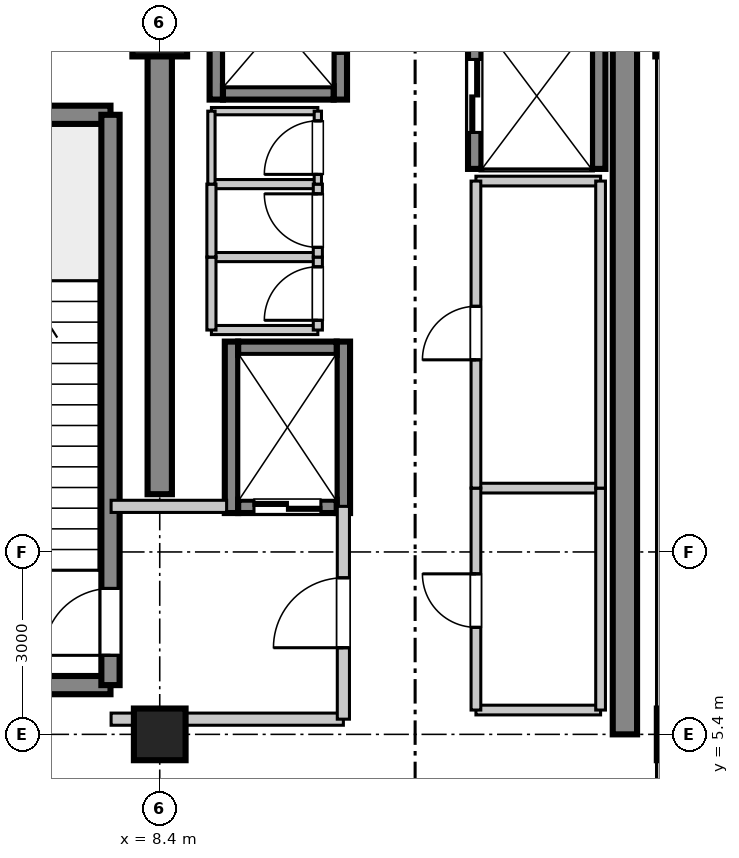
"""IFC4 building model, lengths in metres.
Left out: names, types, materials, properties, quantities, classifications, styles, units other than length and angle.
Written with IfcOpenShell. Run it as: python <this file> out.ifc"""

import sys

from ifc_helpers import new_model, si_unit, direction, frame, frame_2d, origin, origin_2d, place, context, subcontext, project, spatial, rectangle, extrude, source, transform, mapped, element, fill, save


model = new_model("IFC4")
c1 = context("Model", 3, precision=1e-05, world=origin(), true_north=direction((0.0, 1.0)))
c2 = subcontext(c1, "Body", "Model", "MODEL_VIEW")
j1 = project(units=[si_unit("LENGTHUNIT", "METRE"), si_unit("PLANEANGLEUNIT", "RADIAN")], contexts=[c1])
p1 = place(None, origin())
s1 = spatial("IfcSite", under=j1, at=p1, CompositionType="ELEMENT")
p2 = place(p1, origin())
s2 = spatial("IfcBuilding", under=s1, at=p2, CompositionType="ELEMENT")
p3 = place(p2, frame((0.0, 0.0, 352.05)))
s3 = spatial("IfcBuildingStorey", under=s2, at=p3, CompositionType="ELEMENT", Elevation=352.05)
m1 = source(origin(), c2, "Body", "SweptSolid", [
    extrude(rectangle(XDim=0.85, YDim=0.85, at=origin_2d()), origin(), (0.0, 0.0, 1.0), 4.955),
])
p4 = place(p3, frame((8.4, 5.4, 0.0), z_axis=(0.0, 0.0, 1.0), x_axis=(1.0, 0.0, 0.0)))
e1 = element("IfcColumn", 1, at=p4, inside=s3, PredefinedType="PILASTER", context=c2, shape_type="MappedRepresentation", body=[
    mapped(m1, transform((0.0, 0.0, 0.0), scale=1.0)),
])
m2 = source(origin(), c2, "Body", "SweptSolid", [
    extrude(rectangle(XDim=0.9, YDim=0.9, at=origin_2d()), origin(), (0.0, 0.0, 1.0), 4.955),
])
p5 = place(p3, frame((8.4, 17.0, 0.0), z_axis=(0.0, 0.0, 1.0), x_axis=(1.0, 0.0, 0.0)))
e2 = element("IfcColumn", 2, at=p5, inside=s3, PredefinedType="COLUMN", context=c2, shape_type="MappedRepresentation", body=[
    mapped(m2, transform((0.0, 0.0, 0.0), scale=1.0)),
])
p6 = place(p3, frame((17.0, 5.4, 0.0), z_axis=(0.0, 0.0, 1.0), x_axis=(1.0, 0.0, 0.0)))
e3 = element("IfcColumn", 3, at=p6, inside=s3, PredefinedType="PILASTER", context=c2, shape_type="MappedRepresentation", body=[
    mapped(m1, transform((0.0, 0.0, 0.0), scale=1.0)),
])
p7 = place(p3, frame((17.0, 17.0, 0.0), z_axis=(0.0, 0.0, 1.0), x_axis=(1.0, 0.0, 0.0)))
e4 = element("IfcColumn", 4, at=p7, inside=s3, PredefinedType="COLUMN", context=c2, shape_type="MappedRepresentation", body=[
    mapped(m2, transform((0.0, 0.0, 0.0), scale=1.0)),
])
m3 = source(origin(), c2, "Body", "SweptSolid", [
    extrude(rectangle(XDim=7.65, YDim=0.4, at=frame_2d((3.825, 0.0))), origin(), (0.0, 0.0, 1.0), 4.7),
])
p8 = place(p3, frame((8.4, 9.35, 0.0), z_axis=(0.0, 0.0, 1.0), x_axis=(0.0, 1.0, 0.0)))
e5 = element("IfcWall", 5, at=p8, inside=s3, PredefinedType="SHEAR", context=c2, shape_type="MappedRepresentation", body=[
    mapped(m3, transform((0.0, 0.0, 0.0), scale=1.0)),
])
m4 = source(origin(), c2, "Body", "SweptSolid", [
    extrude(rectangle(XDim=11.6, YDim=0.4, at=frame_2d((5.8, 0.0))), origin(), (0.0, 0.0, 1.0), 4.7),
])
p9 = place(p3, frame((16.05, 5.4, 0.0), z_axis=(0.0, 0.0, 1.0), x_axis=(0.0, 1.0, 0.0)))
e6 = element("IfcWall", 6, at=p9, inside=s3, PredefinedType="SHEAR", context=c2, shape_type="MappedRepresentation", body=[
    mapped(m4, transform((0.0, 0.0, 0.0), scale=1.0)),
])
m5 = source(origin(), c2, "Body", "SweptSolid", [
    extrude(rectangle(XDim=3.98, YDim=0.3, at=frame_2d((1.99, 0.0))), origin(), (0.0, 0.0, 1.0), 4.7),
])
for number, where, z_axis, x_axis in (
    (7, (3.61, 6.21, 0.0), (0.0, 0.0, 1.0), (1.0, 0.0, 0.0)),
    (8, (3.61, 15.59, 0.0), (0.0, 0.0, 1.0), (1.0, 0.0, 0.0)),
):
    element("IfcWall", number, at=place(p3, frame(where, z_axis=z_axis, x_axis=x_axis)), inside=s3, PredefinedType="SHEAR", context=c2, shape_type="MappedRepresentation", body=[
        mapped(m5, transform((0.0, 0.0, 0.0), scale=1.0)),
    ])
m6 = source(origin(), c2, "Body", "SweptSolid", [
    extrude(rectangle(XDim=9.38, YDim=0.3, at=frame_2d((4.69, 0.0))), origin(), (0.0, 0.0, 1.0), 4.7),
])
p10 = place(p3, frame((7.59, 6.21, 0.0), z_axis=(0.0, 0.0, 1.0), x_axis=(0.0, 1.0, 0.0)))
e9 = element("IfcWall", 9, at=p10, inside=s3, PredefinedType="SHEAR", context=c2, shape_type="MappedRepresentation", body=[
    mapped(m6, transform((0.0, 0.0, 0.0), scale=1.0)),
])
p11 = place(p10, frame((0.49, 0.0, 0.0)))
e10 = element("IfcOpeningElement", 10, at=p11, cuts=e9, PredefinedType="OPENING", context=c2, shape_type="SweptSolid", body=[
    extrude(rectangle(XDim=1.1, YDim=2.15, at=frame_2d((0.55, 1.075))), frame((0.0, 0.16, 0.0), z_axis=(0.0, -1.0, 0.0), x_axis=(1.0, 0.0, 0.0)), (0.0, 0.0, 1.0), 0.32),
])
m7 = source(origin(), c2, "Body", "SweptSolid", [
    extrude(rectangle(XDim=2.385, YDim=0.22, at=frame_2d((1.192, 0.0))), origin(), (0.0, 0.0, 1.0), 4.7),
])
p12 = place(p3, frame((9.33, 15.84, 0.0), z_axis=(0.0, 0.0, 1.0), x_axis=(0.0, 1.0, 0.0)))
e11 = element("IfcWall", 11, at=p12, inside=s3, PredefinedType="SHEAR", context=c2, shape_type="MappedRepresentation", body=[
    mapped(m7, transform((0.0, 0.0, 0.0), scale=1.0)),
])
p13 = place(p3, frame((11.37, 15.84, 0.0), z_axis=(0.0, 0.0, 1.0), x_axis=(0.0, 1.0, 0.0)))
e12 = element("IfcWall", 12, at=p13, inside=s3, PredefinedType="SHEAR", context=c2, shape_type="MappedRepresentation", body=[
    mapped(m7, transform((0.0, 0.0, 0.0), scale=1.0)),
])
p14 = place(p13, frame((0.76, 0.0, 0.0)))
e13 = element("IfcOpeningElement", 13, at=p14, cuts=e12, PredefinedType="OPENING", context=c2, shape_type="SweptSolid", body=[
    extrude(rectangle(XDim=1.0, YDim=2.2, at=frame_2d((0.5, 1.1))), frame((0.0, 0.12, 0.0), z_axis=(0.0, -1.0, 0.0), x_axis=(1.0, 0.0, 0.0)), (0.0, 0.0, 1.0), 0.24),
])
m8 = source(origin(), c2, "Body", "SweptSolid", [
    extrude(rectangle(XDim=1.82, YDim=0.22, at=frame_2d((0.91, 0.0))), origin(), (0.0, 0.0, 1.0), 4.7),
])
p15 = place(p3, frame((9.44, 15.95, 0.0), z_axis=(0.0, 0.0, 1.0), x_axis=(1.0, 0.0, 0.0)))
e14 = element("IfcWall", 14, at=p15, inside=s3, PredefinedType="SHEAR", context=c2, shape_type="MappedRepresentation", body=[
    mapped(m8, transform((0.0, 0.0, 0.0), scale=1.0)),
])
m9 = source(origin(), c2, "Body", "SweptSolid", [
    extrude(rectangle(XDim=2.82, YDim=0.22, at=frame_2d((1.41, 0.0))), origin(), (0.0, 0.0, 1.0), 4.7),
])
for number, where, z_axis, x_axis in (
    (15, (9.58, 9.04, 0.0), (0.0, 0.0, 1.0), (0.0, 1.0, 0.0)),
    (16, (11.42, 9.04, 0.0), (0.0, 0.0, 1.0), (0.0, 1.0, 0.0)),
):
    element("IfcWall", number, at=place(p3, frame(where, z_axis=z_axis, x_axis=x_axis)), inside=s3, PredefinedType="SHEAR", context=c2, shape_type="MappedRepresentation", body=[
        mapped(m9, transform((0.0, 0.0, 0.0), scale=1.0)),
    ])
m10 = source(origin(), c2, "Body", "SweptSolid", [
    extrude(rectangle(XDim=1.62, YDim=0.22, at=frame_2d((0.81, 0.0))), origin(), (0.0, 0.0, 1.0), 4.7),
])
p16 = place(p3, frame((9.69, 9.15, 0.0), z_axis=(0.0, 0.0, 1.0), x_axis=(1.0, 0.0, 0.0)))
e17 = element("IfcWall", 17, at=p16, inside=s3, PredefinedType="SHEAR", context=c2, shape_type="MappedRepresentation", body=[
    mapped(m10, transform((0.0, 0.0, 0.0), scale=1.0)),
])
p17 = place(p16, frame((0.26, 0.0, 0.0)))
e18 = element("IfcOpeningElement", 18, at=p17, cuts=e17, PredefinedType="OPENING", context=c2, shape_type="SweptSolid", body=[
    extrude(rectangle(XDim=1.1, YDim=2.2, at=frame_2d((0.55, 1.1))), frame((0.0, 0.12, 0.0), z_axis=(0.0, -1.0, 0.0), x_axis=(1.0, 0.0, 0.0)), (0.0, 0.0, 1.0), 0.24),
])
p18 = place(p3, frame((9.69, 11.75, 0.0), z_axis=(0.0, 0.0, 1.0), x_axis=(1.0, 0.0, 0.0)))
e19 = element("IfcWall", 19, at=p18, inside=s3, PredefinedType="SHEAR", context=c2, shape_type="MappedRepresentation", body=[
    mapped(m10, transform((0.0, 0.0, 0.0), scale=1.0)),
])
m11 = source(origin(), c2, "Body", "SweptSolid", [
    extrude(rectangle(XDim=2.61, YDim=0.22, at=frame_2d((1.305, 0.0))), origin(), (0.0, 0.0, 1.0), 4.7),
])
p19 = place(p3, frame((13.58, 14.7, 0.0), z_axis=(0.0, 0.0, 1.0), x_axis=(0.0, 1.0, 0.0)))
e20 = element("IfcWall", 20, at=p19, inside=s3, PredefinedType="SHEAR", context=c2, shape_type="MappedRepresentation", body=[
    mapped(m11, transform((0.0, 0.0, 0.0), scale=1.0)),
])
p20 = place(p19, frame((0.6, 0.0, 0.0)))
e21 = element("IfcOpeningElement", 21, at=p20, cuts=e20, PredefinedType="OPENING", context=c2, shape_type="SweptSolid", body=[
    extrude(rectangle(XDim=1.2, YDim=2.2, at=frame_2d((0.6, 1.1))), frame((0.0, 0.12, 0.0), z_axis=(0.0, -1.0, 0.0), x_axis=(1.0, 0.0, 0.0)), (0.0, 0.0, 1.0), 0.24),
])
p21 = place(p3, frame((15.62, 14.7, 0.0), z_axis=(0.0, 0.0, 1.0), x_axis=(0.0, 1.0, 0.0)))
e22 = element("IfcWall", 22, at=p21, inside=s3, PredefinedType="SHEAR", context=c2, shape_type="MappedRepresentation", body=[
    mapped(m11, transform((0.0, 0.0, 0.0), scale=1.0)),
])
m12 = source(origin(), c2, "Body", "SweptSolid", [
    extrude(rectangle(XDim=3.82, YDim=0.2, at=frame_2d((1.91, 0.0))), origin(), (0.0, 0.0, 1.0), 3.4),
])
p22 = place(p3, frame((7.6, 5.65, 0.0), z_axis=(0.0, 0.0, 1.0), x_axis=(1.0, 0.0, 0.0)))
e23 = element("IfcWall", 23, at=p22, inside=s3, PredefinedType="PARTITIONING", context=c2, shape_type="MappedRepresentation", body=[
    mapped(m12, transform((0.0, 0.0, 0.0), scale=1.0)),
])
m13 = source(origin(), c2, "Body", "SweptSolid", [
    extrude(rectangle(XDim=1.9, YDim=0.2, at=frame_2d((0.95, 0.0))), origin(), (0.0, 0.0, 1.0), 3.4),
])
p23 = place(p3, frame((7.6, 9.15, 0.0), z_axis=(0.0, 0.0, 1.0), x_axis=(1.0, 0.0, 0.0)))
e24 = element("IfcWall", 24, at=p23, inside=s3, PredefinedType="PARTITIONING", context=c2, shape_type="MappedRepresentation", body=[
    mapped(m13, transform((0.0, 0.0, 0.0), scale=1.0)),
])
m14 = source(origin(), c2, "Body", "SweptSolid", [
    extrude(rectangle(XDim=3.5, YDim=0.2, at=frame_2d((1.75, 0.0))), origin(), (0.0, 0.0, 1.0), 3.4),
])
p24 = place(p3, frame((11.42, 5.65, 0.0), z_axis=(0.0, 0.0, 1.0), x_axis=(0.0, 1.0, 0.0)))
e25 = element("IfcWall", 25, at=p24, inside=s3, PredefinedType="PARTITIONING", context=c2, shape_type="MappedRepresentation", body=[
    mapped(m14, transform((0.0, 0.0, 0.0), scale=1.0)),
])
p25 = place(p24, frame((1.175, 0.0, 0.0)))
e26 = element("IfcOpeningElement", 26, at=p25, cuts=e25, PredefinedType="OPENING", context=c2, shape_type="SweptSolid", body=[
    extrude(rectangle(XDim=1.15, YDim=2.15, at=frame_2d((0.575, 1.075))), frame((0.0, 0.11, 0.0), z_axis=(0.0, -1.0, 0.0), x_axis=(1.0, 0.0, 0.0)), (0.0, 0.0, 1.0), 0.22),
])
m15 = source(origin(), c2, "Body", "SweptSolid", [
    extrude(rectangle(XDim=1.75, YDim=0.15, at=frame_2d((0.875, 0.0))), origin(), (0.0, 0.0, 1.0), 3.4),
])
for number, where, z_axis, x_axis in (
    (27, (9.25, 12.05, 0.0), (0.0, 0.0, 1.0), (1.0, 0.0, 0.0)),
    (28, (9.25, 13.25, 0.0), (0.0, 0.0, 1.0), (1.0, 0.0, 0.0)),
):
    element("IfcWall", number, at=place(p3, frame(where, z_axis=z_axis, x_axis=x_axis)), inside=s3, PredefinedType="PARTITIONING", context=c2, shape_type="MappedRepresentation", body=[
        mapped(m15, transform((0.0, 0.0, 0.0), scale=1.0)),
    ])
m16 = source(origin(), c2, "Body", "SweptSolid", [
    extrude(rectangle(XDim=1.2, YDim=0.15, at=frame_2d((0.6, 0.0))), origin(), (0.0, 0.0, 1.0), 3.4),
])
p26 = place(p3, frame((9.25, 12.05, 0.0), z_axis=(0.0, 0.0, 1.0), x_axis=(0.0, 1.0, 0.0)))
e29 = element("IfcWall", 29, at=p26, inside=s3, PredefinedType="PARTITIONING", context=c2, shape_type="MappedRepresentation", body=[
    mapped(m16, transform((0.0, 0.0, 0.0), scale=1.0)),
])
p27 = place(p3, frame((11.0, 12.05, 0.0), z_axis=(0.0, 0.0, 1.0), x_axis=(0.0, 1.0, 0.0)))
e30 = element("IfcWall", 30, at=p27, inside=s3, PredefinedType="PARTITIONING", context=c2, shape_type="MappedRepresentation", body=[
    mapped(m16, transform((0.0, 0.0, 0.0), scale=1.0)),
])
p28 = place(p27, frame((0.16, 0.0, 0.0)))
e31 = element("IfcOpeningElement", 31, at=p28, cuts=e30, PredefinedType="OPENING", context=c2, shape_type="SweptSolid", body=[
    extrude(rectangle(XDim=0.88, YDim=2.1, at=frame_2d((0.44, 1.05))), frame((0.0, 0.085, 0.0), z_axis=(0.0, -1.0, 0.0), x_axis=(1.0, 0.0, 0.0)), (0.0, 0.0, 1.0), 0.17),
])
p29 = place(p3, frame((9.25, 14.45, 0.0), z_axis=(0.0, 0.0, 1.0), x_axis=(1.0, 0.0, 0.0)))
e32 = element("IfcWall", 32, at=p29, inside=s3, PredefinedType="PARTITIONING", context=c2, shape_type="MappedRepresentation", body=[
    mapped(m15, transform((0.0, 0.0, 0.0), scale=1.0)),
])
p30 = place(p3, frame((9.25, 13.25, 0.0), z_axis=(0.0, 0.0, 1.0), x_axis=(0.0, 1.0, 0.0)))
e33 = element("IfcWall", 33, at=p30, inside=s3, PredefinedType="PARTITIONING", context=c2, shape_type="MappedRepresentation", body=[
    mapped(m16, transform((0.0, 0.0, 0.0), scale=1.0)),
])
p31 = place(p3, frame((11.0, 13.25, 0.0), z_axis=(0.0, 0.0, 1.0), x_axis=(0.0, 1.0, 0.0)))
e34 = element("IfcWall", 34, at=p31, inside=s3, PredefinedType="PARTITIONING", context=c2, shape_type="MappedRepresentation", body=[
    mapped(m16, transform((0.0, 0.0, 0.0), scale=1.0)),
])
p32 = place(p31, frame((0.16, 0.0, 0.0)))
e35 = element("IfcOpeningElement", 35, at=p32, cuts=e34, PredefinedType="OPENING", context=c2, shape_type="SweptSolid", body=[
    extrude(rectangle(XDim=0.88, YDim=2.1, at=frame_2d((0.44, 1.05))), frame((0.0, 0.085, 0.0), z_axis=(0.0, -1.0, 0.0), x_axis=(1.0, 0.0, 0.0)), (0.0, 0.0, 1.0), 0.17),
])
m17 = source(origin(), c2, "Body", "SweptSolid", [
    extrude(rectangle(XDim=1.75, YDim=0.12, at=frame_2d((0.875, 0.0))), origin(), (0.0, 0.0, 1.0), 3.4),
])
p33 = place(p3, frame((9.25, 15.65, 0.0), z_axis=(0.0, 0.0, 1.0), x_axis=(1.0, 0.0, 0.0)))
e36 = element("IfcWall", 36, at=p33, inside=s3, PredefinedType="PARTITIONING", context=c2, shape_type="MappedRepresentation", body=[
    mapped(m17, transform((0.0, 0.0, 0.0), scale=1.0)),
])
m18 = source(origin(), c2, "Body", "SweptSolid", [
    extrude(rectangle(XDim=1.2, YDim=0.12, at=frame_2d((0.6, 0.0))), origin(), (0.0, 0.0, 1.0), 3.4),
])
p34 = place(p3, frame((9.25, 14.45, 0.0), z_axis=(0.0, 0.0, 1.0), x_axis=(0.0, 1.0, 0.0)))
e37 = element("IfcWall", 37, at=p34, inside=s3, PredefinedType="PARTITIONING", context=c2, shape_type="MappedRepresentation", body=[
    mapped(m18, transform((0.0, 0.0, 0.0), scale=1.0)),
])
p35 = place(p3, frame((11.0, 14.45, 0.0), z_axis=(0.0, 0.0, 1.0), x_axis=(0.0, 1.0, 0.0)))
e38 = element("IfcWall", 38, at=p35, inside=s3, PredefinedType="PARTITIONING", context=c2, shape_type="MappedRepresentation", body=[
    mapped(m18, transform((0.0, 0.0, 0.0), scale=1.0)),
])
p36 = place(p35, frame((0.16, 0.0, 0.0)))
e39 = element("IfcOpeningElement", 39, at=p36, cuts=e38, PredefinedType="OPENING", context=c2, shape_type="SweptSolid", body=[
    extrude(rectangle(XDim=0.88, YDim=2.1, at=frame_2d((0.44, 1.05))), frame((0.0, 0.07, 0.0), z_axis=(0.0, -1.0, 0.0), x_axis=(1.0, 0.0, 0.0)), (0.0, 0.0, 1.0), 0.14),
])
m19 = source(origin(), c2, "Body", "SweptSolid", [
    extrude(rectangle(XDim=2.05, YDim=0.16, at=frame_2d((1.025, 0.0))), origin(), (0.0, 0.0, 1.0), 3.4),
])
for number, where, z_axis, x_axis in (
    (40, (13.6, 5.8, 0.0), (0.0, 0.0, 1.0), (1.0, 0.0, 0.0)),
    (41, (13.6, 9.45, 0.0), (0.0, 0.0, 1.0), (1.0, 0.0, 0.0)),
):
    element("IfcWall", number, at=place(p3, frame(where, z_axis=z_axis, x_axis=x_axis)), inside=s3, PredefinedType="PARTITIONING", context=c2, shape_type="MappedRepresentation", body=[
        mapped(m19, transform((0.0, 0.0, 0.0), scale=1.0)),
    ])
m20 = source(origin(), c2, "Body", "SweptSolid", [
    extrude(rectangle(XDim=3.65, YDim=0.16, at=frame_2d((1.825, 0.0))), origin(), (0.0, 0.0, 1.0), 3.4),
])
p37 = place(p3, frame((13.6, 5.8, 0.0), z_axis=(0.0, 0.0, 1.0), x_axis=(0.0, 1.0, 0.0)))
e42 = element("IfcWall", 42, at=p37, inside=s3, PredefinedType="PARTITIONING", context=c2, shape_type="MappedRepresentation", body=[
    mapped(m20, transform((0.0, 0.0, 0.0), scale=1.0)),
])
p38 = place(p37, frame((1.36, 0.0, 0.0)))
e43 = element("IfcOpeningElement", 43, at=p38, cuts=e42, PredefinedType="OPENING", context=c2, shape_type="SweptSolid", body=[
    extrude(rectangle(XDim=0.88, YDim=2.1, at=frame_2d((0.44, 1.05))), frame((0.0, 0.09, 0.0), z_axis=(0.0, -1.0, 0.0), x_axis=(1.0, 0.0, 0.0)), (0.0, 0.0, 1.0), 0.18),
])
p39 = place(p3, frame((15.65, 5.8, 0.0), z_axis=(0.0, 0.0, 1.0), x_axis=(0.0, 1.0, 0.0)))
e44 = element("IfcWall", 44, at=p39, inside=s3, PredefinedType="PARTITIONING", context=c2, shape_type="MappedRepresentation", body=[
    mapped(m20, transform((0.0, 0.0, 0.0), scale=1.0)),
])
p40 = place(p3, frame((13.6, 14.5, 0.0), z_axis=(0.0, 0.0, 1.0), x_axis=(1.0, 0.0, 0.0)))
e45 = element("IfcWall", 45, at=p40, inside=s3, PredefinedType="PARTITIONING", context=c2, shape_type="MappedRepresentation", body=[
    mapped(m19, transform((0.0, 0.0, 0.0), scale=1.0)),
])
m21 = source(origin(), c2, "Body", "SweptSolid", [
    extrude(rectangle(XDim=5.05, YDim=0.16, at=frame_2d((2.525, 0.0))), origin(), (0.0, 0.0, 1.0), 3.4),
])
p41 = place(p3, frame((13.6, 9.45, 0.0), z_axis=(0.0, 0.0, 1.0), x_axis=(0.0, 1.0, 0.0)))
e46 = element("IfcWall", 46, at=p41, inside=s3, PredefinedType="PARTITIONING", context=c2, shape_type="MappedRepresentation", body=[
    mapped(m21, transform((0.0, 0.0, 0.0), scale=1.0)),
])
p42 = place(p41, frame((2.11, 0.0, 0.0)))
e47 = element("IfcOpeningElement", 47, at=p42, cuts=e46, PredefinedType="OPENING", context=c2, shape_type="SweptSolid", body=[
    extrude(rectangle(XDim=0.88, YDim=2.1, at=frame_2d((0.44, 1.05))), frame((0.0, 0.09, 0.0), z_axis=(0.0, -1.0, 0.0), x_axis=(1.0, 0.0, 0.0)), (0.0, 0.0, 1.0), 0.18),
])
p43 = place(p3, frame((15.65, 9.45, 0.0), z_axis=(0.0, 0.0, 1.0), x_axis=(0.0, 1.0, 0.0)))
e48 = element("IfcWall", 48, at=p43, inside=s3, PredefinedType="PARTITIONING", context=c2, shape_type="MappedRepresentation", body=[
    mapped(m21, transform((0.0, 0.0, 0.0), scale=1.0)),
])
m22 = source(origin(), c2, "Body", "SweptSolid", [
    extrude(rectangle(XDim=17.95, YDim=0.16, at=frame_2d((8.975, 0.0))), origin(), (0.0, 0.0, 1.0), 3.4),
])
p44 = place(p3, frame((16.65, 4.55, 0.0), z_axis=(0.0, 0.0, 1.0), x_axis=(0.0, 1.0, 0.0)))
e49 = element("IfcWall", 49, at=p44, inside=s3, PredefinedType="PARTITIONING", context=c2, shape_type="MappedRepresentation", body=[
    mapped(m22, transform((0.0, 0.0, 0.0), scale=1.0)),
])
m23 = source(origin(), c2, "Body", "SweptSolid", [
    extrude(rectangle(XDim=1.1, YDim=2.15, at=frame_2d((0.55, 1.075))), frame((0.0, 0.025, 0.0), z_axis=(0.0, -1.0, 0.0), x_axis=(1.0, 0.0, 0.0)), (0.0, 0.0, 1.0), 0.05),
])
p45 = place(p11, origin())
e50 = element("IfcDoor", 50, at=p45, inside=s3, OperationType="SINGLE_SWING_LEFT", PredefinedType="DOOR", context=c2, shape_type="MappedRepresentation", body=[
    mapped(m23, transform((0.0, 0.0, 0.0), scale=1.0)),
])
fill(e10, e50)
m24 = source(origin(), c2, "Body", "SweptSolid", [
    extrude(rectangle(XDim=1.0, YDim=2.2, at=frame_2d((0.5, 1.1))), frame((0.0, 0.025, 0.0), z_axis=(0.0, -1.0, 0.0), x_axis=(1.0, 0.0, 0.0)), (0.0, 0.0, 1.0), 0.05),
])
p46 = place(p14, frame((1.0, 0.0, 0.0), z_axis=(0.0, 0.0, 1.0), x_axis=(-1.0, 0.0, 0.0)))
e51 = element("IfcDoor", 51, at=p46, inside=s3, OperationType="DOUBLE_DOOR_SLIDING", PredefinedType="DOOR", context=c2, shape_type="MappedRepresentation", body=[
    mapped(m24, transform((0.0, 0.0, 0.0), scale=1.0)),
])
fill(e13, e51)
m25 = source(origin(), c2, "Body", "SweptSolid", [
    extrude(rectangle(XDim=1.1, YDim=2.2, at=frame_2d((0.55, 1.1))), frame((0.0, 0.025, 0.0), z_axis=(0.0, -1.0, 0.0), x_axis=(1.0, 0.0, 0.0)), (0.0, 0.0, 1.0), 0.05),
])
p47 = place(p17, frame((1.1, 0.0, 0.0), z_axis=(0.0, 0.0, 1.0), x_axis=(-1.0, 0.0, 0.0)))
e52 = element("IfcDoor", 52, at=p47, inside=s3, OperationType="DOUBLE_DOOR_SLIDING", PredefinedType="DOOR", context=c2, shape_type="MappedRepresentation", body=[
    mapped(m25, transform((0.0, 0.0, 0.0), scale=1.0)),
])
fill(e18, e52)
m26 = source(origin(), c2, "Body", "SweptSolid", [
    extrude(rectangle(XDim=1.2, YDim=2.2, at=frame_2d((0.6, 1.1))), frame((0.0, 0.025, 0.0), z_axis=(0.0, -1.0, 0.0), x_axis=(1.0, 0.0, 0.0)), (0.0, 0.0, 1.0), 0.05),
])
p48 = place(p20, origin())
e53 = element("IfcDoor", 53, at=p48, inside=s3, OperationType="DOUBLE_DOOR_SLIDING", PredefinedType="DOOR", context=c2, shape_type="MappedRepresentation", body=[
    mapped(m26, transform((0.0, 0.0, 0.0), scale=1.0)),
])
fill(e21, e53)
m27 = source(origin(), c2, "Body", "SweptSolid", [
    extrude(rectangle(XDim=1.15, YDim=2.15, at=frame_2d((0.575, 1.075))), frame((0.0, 0.025, 0.0), z_axis=(0.0, -1.0, 0.0), x_axis=(1.0, 0.0, 0.0)), (0.0, 0.0, 1.0), 0.05),
])
p49 = place(p25, frame((1.15, 0.0, 0.0), z_axis=(0.0, 0.0, 1.0), x_axis=(-1.0, 0.0, 0.0)))
e54 = element("IfcDoor", 54, at=p49, inside=s3, OperationType="SINGLE_SWING_LEFT", PredefinedType="DOOR", context=c2, shape_type="MappedRepresentation", body=[
    mapped(m27, transform((0.0, 0.0, 0.0), scale=1.0)),
])
fill(e26, e54)
m28 = source(origin(), c2, "Body", "SweptSolid", [
    extrude(rectangle(XDim=0.88, YDim=2.1, at=frame_2d((0.44, 1.05))), frame((0.0, 0.025, 0.0), z_axis=(0.0, -1.0, 0.0), x_axis=(1.0, 0.0, 0.0)), (0.0, 0.0, 1.0), 0.05),
])
p50 = place(p28, origin())
e55 = element("IfcDoor", 55, at=p50, inside=s3, OperationType="SINGLE_SWING_LEFT", PredefinedType="DOOR", context=c2, shape_type="MappedRepresentation", body=[
    mapped(m28, transform((0.0, 0.0, 0.0), scale=1.0)),
])
fill(e31, e55)
p51 = place(p32, origin())
e56 = element("IfcDoor", 56, at=p51, inside=s3, OperationType="SINGLE_SWING_RIGHT", PredefinedType="DOOR", context=c2, shape_type="MappedRepresentation", body=[
    mapped(m28, transform((0.0, 0.0, 0.0), scale=1.0)),
])
fill(e35, e56)
p52 = place(p36, origin())
e57 = element("IfcDoor", 57, at=p52, inside=s3, OperationType="SINGLE_SWING_LEFT", PredefinedType="DOOR", context=c2, shape_type="MappedRepresentation", body=[
    mapped(m28, transform((0.0, 0.0, 0.0), scale=1.0)),
])
fill(e39, e57)
p53 = place(p38, frame((0.88, 0.0, 0.0), z_axis=(0.0, 0.0, 1.0), x_axis=(-1.0, 0.0, 0.0)))
e58 = element("IfcDoor", 58, at=p53, inside=s3, OperationType="SINGLE_SWING_RIGHT", PredefinedType="DOOR", context=c2, shape_type="MappedRepresentation", body=[
    mapped(m28, transform((0.0, 0.0, 0.0), scale=1.0)),
])
fill(e43, e58)
p54 = place(p42, frame((0.88, 0.0, 0.0), z_axis=(0.0, 0.0, 1.0), x_axis=(-1.0, 0.0, 0.0)))
e59 = element("IfcDoor", 59, at=p54, inside=s3, OperationType="SINGLE_SWING_LEFT", PredefinedType="DOOR", context=c2, shape_type="MappedRepresentation", body=[
    mapped(m28, transform((0.0, 0.0, 0.0), scale=1.0)),
])
fill(e47, e59)
save(model, sys.argv[1])
